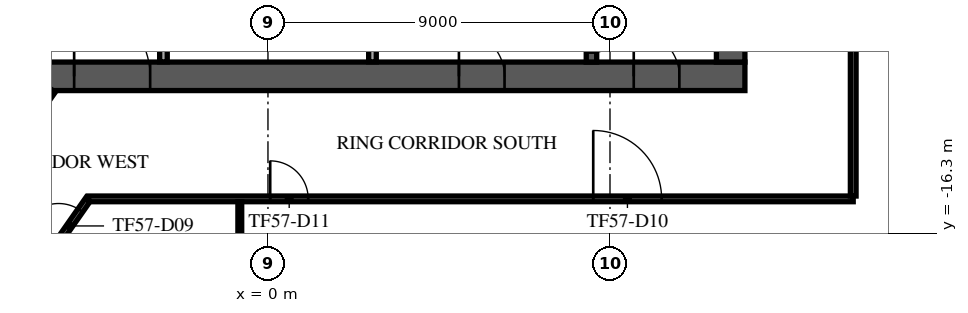
"""IFC4 building model, lengths in metres.
Left out: names, types, materials, properties, quantities, classifications, styles, units other than length and angle.
Written with IfcOpenShell. Run it as: python <this file> out.ifc"""

import sys

from ifc_helpers import new_model, si_unit, direction, frame, frame_2d, origin, place, context, subcontext, project, spatial, rectangle, extrude, element, fill, save


model = new_model("IFC4")
c1 = context("Model", 3, precision=1e-05, world=origin(), true_north=direction((0.0, 1.0)))
c2 = subcontext(c1, "Body", "Model", "MODEL_VIEW")
j1 = project(units=[si_unit("LENGTHUNIT", "METRE"), si_unit("PLANEANGLEUNIT", "RADIAN")], contexts=[c1])
p1 = place(None, origin())
s1 = spatial("IfcSite", under=j1, at=p1, CompositionType="ELEMENT")
p2 = place(p1, origin())
s2 = spatial("IfcBuilding", under=s1, at=p2, CompositionType="ELEMENT")
p3 = place(p2, frame((0.0, 0.0, 242.9)))
s3 = spatial("IfcBuildingStorey", under=s2, at=p3, CompositionType="ELEMENT", Elevation=242.9)
p4 = place(p3, frame((-12.55, -12.175, 0.0), z_axis=(0.0, 0.0, 1.0), x_axis=(1.0, 0.0, 0.0)))
e1 = element("IfcWall", 1, at=p4, inside=s3, PredefinedType="SHEAR", context=c2, shape_type="SweptSolid", body=[
    extrude(rectangle(XDim=25.1, YDim=0.75, at=frame_2d((12.55, 0.0))), origin(), (0.0, 0.0, 1.0), 3.64),
])
p5 = place(p4, frame((7.45, 0.0, 0.0)))
e2 = element("IfcOpeningElement", 2, at=p5, cuts=e1, PredefinedType="OPENING", context=c2, shape_type="SweptSolid", body=[
    extrude(rectangle(XDim=2.0, YDim=2.1, at=frame_2d((1.0, 1.05))), frame((0.0, 0.385, 0.0), z_axis=(0.0, -1.0, 0.0), x_axis=(1.0, 0.0, 0.0)), (0.0, 0.0, 1.0), 0.77),
])
p6 = place(p4, frame((17.575, 0.0, 0.0)))
e3 = element("IfcOpeningElement", 3, at=p6, cuts=e1, PredefinedType="OPENING", context=c2, shape_type="SweptSolid", body=[
    extrude(rectangle(XDim=1.2, YDim=2.1, at=frame_2d((0.6, 1.05))), frame((0.0, 0.385, 0.0), z_axis=(0.0, -1.0, 0.0), x_axis=(1.0, 0.0, 0.0)), (0.0, 0.0, 1.0), 0.77),
])
p7 = place(p4, frame((1.725, 0.0, 0.0)))
e4 = element("IfcOpeningElement", 4, at=p7, cuts=e1, PredefinedType="OPENING", context=c2, shape_type="SweptSolid", body=[
    extrude(rectangle(XDim=1.2, YDim=2.1, at=frame_2d((0.6, 1.05))), frame((0.0, 0.385, 0.0), z_axis=(0.0, -1.0, 0.0), x_axis=(1.0, 0.0, 0.0)), (0.0, 0.0, 1.0), 0.77),
])
p8 = place(p4, frame((22.175, 0.0, 0.0)))
e5 = element("IfcOpeningElement", 5, at=p8, cuts=e1, PredefinedType="OPENING", context=c2, shape_type="SweptSolid", body=[
    extrude(rectangle(XDim=1.2, YDim=2.1, at=frame_2d((0.6, 1.05))), frame((0.0, 0.385, 0.0), z_axis=(0.0, -1.0, 0.0), x_axis=(1.0, 0.0, 0.0)), (0.0, 0.0, 1.0), 0.77),
])
p9 = place(p3, frame((12.175, -11.8, 0.0), z_axis=(0.0, 0.0, 1.0), x_axis=(0.0, 1.0, 0.0)))
e6 = element("IfcWall", 6, at=p9, inside=s3, PredefinedType="SHEAR", context=c2, shape_type="SweptSolid", body=[
    extrude(rectangle(XDim=23.6, YDim=0.75, at=frame_2d((11.8, 0.0))), origin(), (0.0, 0.0, 1.0), 3.64),
])
p10 = place(p9, frame((10.6, 0.0, 0.0)))
e7 = element("IfcOpeningElement", 7, at=p10, cuts=e6, PredefinedType="OPENING", context=c2, shape_type="SweptSolid", body=[
    extrude(rectangle(XDim=2.4, YDim=2.4, at=frame_2d((1.2, 1.2))), frame((0.0, 0.385, 0.0), z_axis=(0.0, -1.0, 0.0), x_axis=(1.0, 0.0, 0.0)), (0.0, 0.0, 1.0), 0.77),
])
p11 = place(p3, frame((8.512, -4.55, 0.0), z_axis=(0.0, 0.0, 1.0), x_axis=(0.0, -1.0, 0.0)))
e8 = element("IfcWall", 8, at=p11, inside=s3, PredefinedType="SOLIDWALL", context=c2, shape_type="SweptSolid", body=[
    extrude(rectangle(XDim=7.25, YDim=0.275, at=frame_2d((3.625, 0.0))), origin(), (0.0, 0.0, 1.0), 3.64),
])
p12 = place(p11, frame((6.0, 0.0, 0.0)))
e9 = element("IfcOpeningElement", 9, at=p12, cuts=e8, PredefinedType="OPENING", context=c2, shape_type="SweptSolid", body=[
    extrude(rectangle(XDim=1.0, YDim=2.1, at=frame_2d((0.5, 1.05))), frame((0.0, 0.147, 0.0), z_axis=(0.0, -1.0, 0.0), x_axis=(1.0, 0.0, 0.0)), (0.0, 0.0, 1.0), 0.295),
])
p13 = place(p3, frame((-2.75, -11.795, 0.0), z_axis=(0.0, 0.0, 1.0), x_axis=(0.0, 1.0, 0.0)))
e10 = element("IfcWall", 10, at=p13, inside=s3, PredefinedType="PARTITIONING", context=c2, shape_type="SweptSolid", body=[
    extrude(rectangle(XDim=2.99, YDim=0.2, at=frame_2d((1.495, 0.0))), origin(), (0.0, 0.0, 1.0), 3.64),
])
p14 = place(p13, frame((0.657, 0.0, 0.0)))
e11 = element("IfcOpeningElement", 11, at=p14, cuts=e10, PredefinedType="OPENING", context=c2, shape_type="SweptSolid", body=[
    extrude(rectangle(XDim=1.8, YDim=2.1, at=frame_2d((0.9, 1.05))), frame((0.0, 0.11, 0.0), z_axis=(0.0, -1.0, 0.0), x_axis=(1.0, 0.0, 0.0)), (0.0, 0.0, 1.0), 0.22),
])
p15 = place(p3, frame((2.75, -11.795, 0.0), z_axis=(0.0, 0.0, 1.0), x_axis=(0.0, 1.0, 0.0)))
e12 = element("IfcWall", 12, at=p15, inside=s3, PredefinedType="PARTITIONING", context=c2, shape_type="SweptSolid", body=[
    extrude(rectangle(XDim=2.99, YDim=0.2, at=frame_2d((1.495, 0.0))), origin(), (0.0, 0.0, 1.0), 3.64),
])
p16 = place(p3, frame((-31.815, -13.98, 0.0), z_axis=(0.0, 0.0, 1.0), x_axis=(0.819151180661, -0.573577669737, 0.0)))
e13 = element("IfcWall", 13, at=p16, inside=s3, PredefinedType="STANDARD", context=c2, shape_type="SweptSolid", body=[
    extrude(rectangle(XDim=36.086, YDim=0.6, at=frame_2d((18.043, 0.0))), origin(), (0.0, 0.0, 1.0), 3.64),
])
p17 = place(p16, frame((1.205, 0.0, 0.9)))
e14 = element("IfcOpeningElement", 14, at=p17, cuts=e13, PredefinedType="OPENING", context=c2, shape_type="SweptSolid", body=[
    extrude(rectangle(XDim=2.1, YDim=2.1, at=frame_2d((1.05, 1.05))), frame((0.0, 0.31, 0.0), z_axis=(0.0, -1.0, 0.0), x_axis=(1.0, 0.0, 0.0)), (0.0, 0.0, 1.0), 0.62),
])
p18 = place(p16, frame((5.716, 0.0, 0.9)))
e15 = element("IfcOpeningElement", 15, at=p18, cuts=e13, PredefinedType="OPENING", context=c2, shape_type="SweptSolid", body=[
    extrude(rectangle(XDim=2.1, YDim=2.1, at=frame_2d((1.05, 1.05))), frame((0.0, 0.31, 0.0), z_axis=(0.0, -1.0, 0.0), x_axis=(1.0, 0.0, 0.0)), (0.0, 0.0, 1.0), 0.62),
])
p19 = place(p16, frame((10.227, 0.0, 0.9)))
e16 = element("IfcOpeningElement", 16, at=p19, cuts=e13, PredefinedType="OPENING", context=c2, shape_type="SweptSolid", body=[
    extrude(rectangle(XDim=2.1, YDim=2.1, at=frame_2d((1.05, 1.05))), frame((0.0, 0.31, 0.0), z_axis=(0.0, -1.0, 0.0), x_axis=(1.0, 0.0, 0.0)), (0.0, 0.0, 1.0), 0.62),
])
p20 = place(p16, frame((14.738, 0.0, 0.9)))
e17 = element("IfcOpeningElement", 17, at=p20, cuts=e13, PredefinedType="OPENING", context=c2, shape_type="SweptSolid", body=[
    extrude(rectangle(XDim=2.1, YDim=2.1, at=frame_2d((1.05, 1.05))), frame((0.0, 0.31, 0.0), z_axis=(0.0, -1.0, 0.0), x_axis=(1.0, 0.0, 0.0)), (0.0, 0.0, 1.0), 0.62),
])
p21 = place(p16, frame((19.249, 0.0, 0.9)))
e18 = element("IfcOpeningElement", 18, at=p21, cuts=e13, PredefinedType="OPENING", context=c2, shape_type="SweptSolid", body=[
    extrude(rectangle(XDim=2.1, YDim=2.1, at=frame_2d((1.05, 1.05))), frame((0.0, 0.31, 0.0), z_axis=(0.0, -1.0, 0.0), x_axis=(1.0, 0.0, 0.0)), (0.0, 0.0, 1.0), 0.62),
])
p22 = place(p16, frame((23.759, 0.0, 0.9)))
e19 = element("IfcOpeningElement", 19, at=p22, cuts=e13, PredefinedType="OPENING", context=c2, shape_type="SweptSolid", body=[
    extrude(rectangle(XDim=2.1, YDim=2.1, at=frame_2d((1.05, 1.05))), frame((0.0, 0.31, 0.0), z_axis=(0.0, -1.0, 0.0), x_axis=(1.0, 0.0, 0.0)), (0.0, 0.0, 1.0), 0.62),
])
p23 = place(p16, frame((28.27, 0.0, 0.9)))
e20 = element("IfcOpeningElement", 20, at=p23, cuts=e13, PredefinedType="OPENING", context=c2, shape_type="SweptSolid", body=[
    extrude(rectangle(XDim=2.1, YDim=2.1, at=frame_2d((1.05, 1.05))), frame((0.0, 0.31, 0.0), z_axis=(0.0, -1.0, 0.0), x_axis=(1.0, 0.0, 0.0)), (0.0, 0.0, 1.0), 0.62),
])
p24 = place(p16, frame((32.781, 0.0, 0.9)))
e21 = element("IfcOpeningElement", 21, at=p24, cuts=e13, PredefinedType="OPENING", context=c2, shape_type="SweptSolid", body=[
    extrude(rectangle(XDim=2.1, YDim=2.1, at=frame_2d((1.05, 1.05))), frame((0.0, 0.31, 0.0), z_axis=(0.0, -1.0, 0.0), x_axis=(1.0, 0.0, 0.0)), (0.0, 0.0, 1.0), 0.62),
])
p25 = place(p3, frame((5.206, -33.362, 0.0), z_axis=(0.0, 0.0, 1.0), x_axis=(0.573577438409, 0.81915134264, 0.0)))
e22 = element("IfcWall", 22, at=p25, inside=s3, PredefinedType="STANDARD", context=c2, shape_type="SweptSolid", body=[
    extrude(rectangle(XDim=48.686, YDim=0.6, at=frame_2d((24.343, 0.0))), origin(), (0.0, 0.0, 1.0), 3.64),
])
p26 = place(p25, frame((1.213, 0.0, 0.9)))
e23 = element("IfcOpeningElement", 23, at=p26, cuts=e22, PredefinedType="OPENING", context=c2, shape_type="SweptSolid", body=[
    extrude(rectangle(XDim=2.0, YDim=2.1, at=frame_2d((1.0, 1.05))), frame((0.0, 0.31, 0.0), z_axis=(0.0, -1.0, 0.0), x_axis=(1.0, 0.0, 0.0)), (0.0, 0.0, 1.0), 0.62),
])
p27 = place(p25, frame((5.639, 0.0, 0.9)))
e24 = element("IfcOpeningElement", 24, at=p27, cuts=e22, PredefinedType="OPENING", context=c2, shape_type="SweptSolid", body=[
    extrude(rectangle(XDim=2.0, YDim=2.1, at=frame_2d((1.0, 1.05))), frame((0.0, 0.31, 0.0), z_axis=(0.0, -1.0, 0.0), x_axis=(1.0, 0.0, 0.0)), (0.0, 0.0, 1.0), 0.62),
])
p28 = place(p25, frame((10.065, 0.0, 0.9)))
e25 = element("IfcOpeningElement", 25, at=p28, cuts=e22, PredefinedType="OPENING", context=c2, shape_type="SweptSolid", body=[
    extrude(rectangle(XDim=2.0, YDim=2.1, at=frame_2d((1.0, 1.05))), frame((0.0, 0.31, 0.0), z_axis=(0.0, -1.0, 0.0), x_axis=(1.0, 0.0, 0.0)), (0.0, 0.0, 1.0), 0.62),
])
p29 = place(p25, frame((14.491, 0.0, 0.9)))
e26 = element("IfcOpeningElement", 26, at=p29, cuts=e22, PredefinedType="OPENING", context=c2, shape_type="SweptSolid", body=[
    extrude(rectangle(XDim=2.0, YDim=2.1, at=frame_2d((1.0, 1.05))), frame((0.0, 0.31, 0.0), z_axis=(0.0, -1.0, 0.0), x_axis=(1.0, 0.0, 0.0)), (0.0, 0.0, 1.0), 0.62),
])
p30 = place(p25, frame((18.917, 0.0, 0.9)))
e27 = element("IfcOpeningElement", 27, at=p30, cuts=e22, PredefinedType="OPENING", context=c2, shape_type="SweptSolid", body=[
    extrude(rectangle(XDim=2.0, YDim=2.1, at=frame_2d((1.0, 1.05))), frame((0.0, 0.31, 0.0), z_axis=(0.0, -1.0, 0.0), x_axis=(1.0, 0.0, 0.0)), (0.0, 0.0, 1.0), 0.62),
])
p31 = place(p25, frame((23.343, 0.0, 0.9)))
e28 = element("IfcOpeningElement", 28, at=p31, cuts=e22, PredefinedType="OPENING", context=c2, shape_type="SweptSolid", body=[
    extrude(rectangle(XDim=2.0, YDim=2.1, at=frame_2d((1.0, 1.05))), frame((0.0, 0.31, 0.0), z_axis=(0.0, -1.0, 0.0), x_axis=(1.0, 0.0, 0.0)), (0.0, 0.0, 1.0), 0.62),
])
p32 = place(p25, frame((27.769, 0.0, 0.9)))
e29 = element("IfcOpeningElement", 29, at=p32, cuts=e22, PredefinedType="OPENING", context=c2, shape_type="SweptSolid", body=[
    extrude(rectangle(XDim=2.0, YDim=2.1, at=frame_2d((1.0, 1.05))), frame((0.0, 0.31, 0.0), z_axis=(0.0, -1.0, 0.0), x_axis=(1.0, 0.0, 0.0)), (0.0, 0.0, 1.0), 0.62),
])
p33 = place(p25, frame((32.195, 0.0, 0.9)))
e30 = element("IfcOpeningElement", 30, at=p33, cuts=e22, PredefinedType="OPENING", context=c2, shape_type="SweptSolid", body=[
    extrude(rectangle(XDim=2.0, YDim=2.1, at=frame_2d((1.0, 1.05))), frame((0.0, 0.31, 0.0), z_axis=(0.0, -1.0, 0.0), x_axis=(1.0, 0.0, 0.0)), (0.0, 0.0, 1.0), 0.62),
])
p34 = place(p25, frame((36.621, 0.0, 0.9)))
e31 = element("IfcOpeningElement", 31, at=p34, cuts=e22, PredefinedType="OPENING", context=c2, shape_type="SweptSolid", body=[
    extrude(rectangle(XDim=2.0, YDim=2.1, at=frame_2d((1.0, 1.05))), frame((0.0, 0.31, 0.0), z_axis=(0.0, -1.0, 0.0), x_axis=(1.0, 0.0, 0.0)), (0.0, 0.0, 1.0), 0.62),
])
p35 = place(p25, frame((41.047, 0.0, 0.9)))
e32 = element("IfcOpeningElement", 32, at=p35, cuts=e22, PredefinedType="OPENING", context=c2, shape_type="SweptSolid", body=[
    extrude(rectangle(XDim=2.0, YDim=2.1, at=frame_2d((1.0, 1.05))), frame((0.0, 0.31, 0.0), z_axis=(0.0, -1.0, 0.0), x_axis=(1.0, 0.0, 0.0)), (0.0, 0.0, 1.0), 0.62),
])
p36 = place(p25, frame((45.473, 0.0, 0.9)))
e33 = element("IfcOpeningElement", 33, at=p36, cuts=e22, PredefinedType="OPENING", context=c2, shape_type="SweptSolid", body=[
    extrude(rectangle(XDim=2.0, YDim=2.1, at=frame_2d((1.0, 1.05))), frame((0.0, 0.31, 0.0), z_axis=(0.0, -1.0, 0.0), x_axis=(1.0, 0.0, 0.0)), (0.0, 0.0, 1.0), 0.62),
])
p37 = place(p3, frame((-26.231, -7.537, 0.0), z_axis=(0.0, 0.0, 1.0), x_axis=(0.819166569978, -0.573555690959, 0.0)))
e34 = element("IfcWall", 34, at=p37, inside=s3, PredefinedType="PARTITIONING", context=c2, shape_type="SweptSolid", body=[
    extrude(rectangle(XDim=34.403, YDim=0.15, at=frame_2d((17.201, 0.0))), origin(), (0.0, 0.0, 1.0), 3.24),
])
p38 = place(p37, frame((3.05, 0.0, 0.0)))
e35 = element("IfcOpeningElement", 35, at=p38, cuts=e34, PredefinedType="OPENING", context=c2, shape_type="SweptSolid", body=[
    extrude(rectangle(XDim=1.8, YDim=2.1, at=frame_2d((0.9, 1.05))), frame((0.0, 0.085, 0.0), z_axis=(0.0, -1.0, 0.0), x_axis=(1.0, 0.0, 0.0)), (0.0, 0.0, 1.0), 0.17),
])
p39 = place(p37, frame((13.103, 0.0, 0.0)))
e36 = element("IfcOpeningElement", 36, at=p39, cuts=e34, PredefinedType="OPENING", context=c2, shape_type="SweptSolid", body=[
    extrude(rectangle(XDim=1.0, YDim=2.1, at=frame_2d((0.5, 1.05))), frame((0.0, 0.085, 0.0), z_axis=(0.0, -1.0, 0.0), x_axis=(1.0, 0.0, 0.0)), (0.0, 0.0, 1.0), 0.17),
])
p40 = place(p37, frame((19.173, 0.0, 0.0)))
e37 = element("IfcOpeningElement", 37, at=p40, cuts=e34, PredefinedType="OPENING", context=c2, shape_type="SweptSolid", body=[
    extrude(rectangle(XDim=1.0, YDim=2.1, at=frame_2d((0.5, 1.05))), frame((0.0, 0.085, 0.0), z_axis=(0.0, -1.0, 0.0), x_axis=(1.0, 0.0, 0.0)), (0.0, 0.0, 1.0), 0.17),
])
p41 = place(p3, frame((-8.651, -16.825, 0.0), z_axis=(0.0, 0.0, 1.0), x_axis=(0.57354712093, 0.819172570386, 0.0)))
e38 = element("IfcWall", 38, at=p41, inside=s3, PredefinedType="PARTITIONING", context=c2, shape_type="SweptSolid", body=[
    extrude(rectangle(XDim=5.218, YDim=0.15, at=frame_2d((2.609, 0.0))), origin(), (0.0, 0.0, 1.0), 3.24),
])
p42 = place(p3, frame((-6.685, -18.201, 0.0), z_axis=(0.0, 0.0, 1.0), x_axis=(0.573438386326, 0.819248690623, 0.0)))
e39 = element("IfcWall", 39, at=p42, inside=s3, PredefinedType="PARTITIONING", context=c2, shape_type="SweptSolid", body=[
    extrude(rectangle(XDim=3.42, YDim=0.15, at=frame_2d((1.71, 0.0))), origin(), (0.0, 0.0, 1.0), 3.24),
])
p43 = place(p42, frame((2.05, 0.0, 0.0)))
e40 = element("IfcOpeningElement", 40, at=p43, cuts=e39, PredefinedType="OPENING", context=c2, shape_type="SweptSolid", body=[
    extrude(rectangle(XDim=1.0, YDim=2.1, at=frame_2d((0.5, 1.05))), frame((0.0, 0.085, 0.0), z_axis=(0.0, -1.0, 0.0), x_axis=(1.0, 0.0, 0.0)), (0.0, 0.0, 1.0), 0.17),
])
p44 = place(p3, frame((-4.723, -15.4, 0.0), z_axis=(0.0, 0.0, 1.0), x_axis=(1.0, 0.0, 0.0)))
e41 = element("IfcWall", 41, at=p44, inside=s3, PredefinedType="PARTITIONING", context=c2, shape_type="SweptSolid", body=[
    extrude(rectangle(XDim=20.123, YDim=0.15, at=frame_2d((10.062, 0.0))), origin(), (0.0, 0.0, 1.0), 3.24),
])
p45 = place(p44, frame((13.282, 0.0, 0.0)))
e42 = element("IfcOpeningElement", 42, at=p45, cuts=e41, PredefinedType="OPENING", context=c2, shape_type="SweptSolid", body=[
    extrude(rectangle(XDim=1.8, YDim=2.1, at=frame_2d((0.9, 1.05))), frame((0.0, 0.085, 0.0), z_axis=(0.0, -1.0, 0.0), x_axis=(1.0, 0.0, 0.0)), (0.0, 0.0, 1.0), 0.17),
])
p46 = place(p44, frame((4.782, 0.0, 0.0)))
e43 = element("IfcOpeningElement", 43, at=p46, cuts=e41, PredefinedType="OPENING", context=c2, shape_type="SweptSolid", body=[
    extrude(rectangle(XDim=1.0, YDim=2.1, at=frame_2d((0.5, 1.05))), frame((0.0, 0.085, 0.0), z_axis=(0.0, -1.0, 0.0), x_axis=(1.0, 0.0, 0.0)), (0.0, 0.0, 1.0), 0.17),
])
p47 = place(p3, frame((15.4, -15.325, 0.0), z_axis=(0.0, 0.0, 1.0), x_axis=(0.0, 1.0, 0.0)))
e44 = element("IfcWall", 44, at=p47, inside=s3, PredefinedType="PARTITIONING", context=c2, shape_type="SweptSolid", body=[
    extrude(rectangle(XDim=17.715, YDim=0.15, at=frame_2d((8.857, 0.0))), origin(), (0.0, 0.0, 1.0), 3.24),
])
p48 = place(p47, frame((7.812, 0.0, 0.0)))
e45 = element("IfcOpeningElement", 45, at=p48, cuts=e44, PredefinedType="OPENING", context=c2, shape_type="SweptSolid", body=[
    extrude(rectangle(XDim=1.0, YDim=2.1, at=frame_2d((0.5, 1.05))), frame((0.0, 0.085, 0.0), z_axis=(0.0, -1.0, 0.0), x_axis=(1.0, 0.0, 0.0)), (0.0, 0.0, 1.0), 0.17),
])
p49 = place(p47, frame((15.123, 0.0, 0.0)))
e46 = element("IfcOpeningElement", 46, at=p49, cuts=e44, PredefinedType="OPENING", context=c2, shape_type="SweptSolid", body=[
    extrude(rectangle(XDim=1.0, YDim=2.1, at=frame_2d((0.5, 1.05))), frame((0.0, 0.085, 0.0), z_axis=(0.0, -1.0, 0.0), x_axis=(1.0, 0.0, 0.0)), (0.0, 0.0, 1.0), 0.17),
])
p50 = place(p3, frame((-0.741, -18.761, 0.0), z_axis=(0.0, 0.0, 1.0), x_axis=(0.0, 1.0, 0.0)))
e47 = element("IfcWall", 47, at=p50, inside=s3, PredefinedType="PARTITIONING", context=c2, shape_type="SweptSolid", body=[
    extrude(rectangle(XDim=3.286, YDim=0.1, at=frame_2d((1.643, 0.0))), origin(), (0.0, 0.0, 1.0), 3.64),
])
p51 = place(p3, frame((15.482, -11.068, 0.0), z_axis=(0.0, 0.0, 1.0), x_axis=(0.990680100766, -0.136209169832, 0.0)))
e48 = element("IfcWall", 48, at=p51, inside=s3, PredefinedType="PARTITIONING", context=c2, shape_type="SweptSolid", body=[
    extrude(rectangle(XDim=4.573, YDim=0.1, at=frame_2d((2.286, 0.0))), origin(), (0.0, 0.0, 1.0), 3.12),
])
p52 = place(p5, origin())
e49 = element("IfcDoor", 49, at=p52, inside=s3, OperationType="SINGLE_SWING_LEFT", PredefinedType="DOOR", context=c2, shape_type="SweptSolid", body=[
    extrude(rectangle(XDim=2.0, YDim=2.1, at=frame_2d((1.0, 1.05))), frame((0.0, 0.025, 0.0), z_axis=(0.0, -1.0, 0.0), x_axis=(1.0, 0.0, 0.0)), (0.0, 0.0, 1.0), 0.05),
])
fill(e2, e49)
p53 = place(p6, origin())
e50 = element("IfcDoor", 50, at=p53, inside=s3, OperationType="SINGLE_SWING_LEFT", PredefinedType="DOOR", context=c2, shape_type="SweptSolid", body=[
    extrude(rectangle(XDim=1.2, YDim=2.1, at=frame_2d((0.6, 1.05))), frame((0.0, 0.025, 0.0), z_axis=(0.0, -1.0, 0.0), x_axis=(1.0, 0.0, 0.0)), (0.0, 0.0, 1.0), 0.05),
])
fill(e3, e50)
p54 = place(p8, origin())
e51 = element("IfcDoor", 51, at=p54, inside=s3, OperationType="SINGLE_SWING_LEFT", PredefinedType="DOOR", context=c2, shape_type="SweptSolid", body=[
    extrude(rectangle(XDim=1.2, YDim=2.1, at=frame_2d((0.6, 1.05))), frame((0.0, 0.025, 0.0), z_axis=(0.0, -1.0, 0.0), x_axis=(1.0, 0.0, 0.0)), (0.0, 0.0, 1.0), 0.05),
])
fill(e5, e51)
p55 = place(p30, origin())
e52 = element("IfcWindow", 52, at=p55, inside=s3, PartitioningType="SINGLE_PANEL", PredefinedType="WINDOW", context=c2, shape_type="SweptSolid", body=[
    extrude(rectangle(XDim=2.0, YDim=2.1, at=frame_2d((1.0, 1.05))), frame((0.0, 0.03, 0.0), z_axis=(0.0, -1.0, 0.0), x_axis=(1.0, 0.0, 0.0)), (0.0, 0.0, 1.0), 0.06),
])
fill(e27, e52)
p56 = place(p43, frame((1.0, 0.0, 0.0), z_axis=(0.0, 0.0, 1.0), x_axis=(-1.0, 0.0, 0.0)))
e53 = element("IfcDoor", 53, at=p56, inside=s3, OperationType="SINGLE_SWING_LEFT", PredefinedType="DOOR", context=c2, shape_type="SweptSolid", body=[
    extrude(rectangle(XDim=1.0, YDim=2.1, at=frame_2d((0.5, 1.05))), frame((0.0, 0.025, 0.0), z_axis=(0.0, -1.0, 0.0), x_axis=(1.0, 0.0, 0.0)), (0.0, 0.0, 1.0), 0.05),
])
fill(e40, e53)
p57 = place(p45, frame((1.8, 0.0, 0.0), z_axis=(0.0, 0.0, 1.0), x_axis=(-1.0, 0.0, 0.0)))
e54 = element("IfcDoor", 54, at=p57, inside=s3, OperationType="DOUBLE_DOOR_SINGLE_SWING", PredefinedType="DOOR", context=c2, shape_type="SweptSolid", body=[
    extrude(rectangle(XDim=1.8, YDim=2.1, at=frame_2d((0.9, 1.05))), frame((0.0, 0.025, 0.0), z_axis=(0.0, -1.0, 0.0), x_axis=(1.0, 0.0, 0.0)), (0.0, 0.0, 1.0), 0.05),
])
fill(e42, e54)
p58 = place(p46, frame((1.0, 0.0, 0.0), z_axis=(0.0, 0.0, 1.0), x_axis=(-1.0, 0.0, 0.0)))
e55 = element("IfcDoor", 55, at=p58, inside=s3, OperationType="SINGLE_SWING_RIGHT", PredefinedType="DOOR", context=c2, shape_type="SweptSolid", body=[
    extrude(rectangle(XDim=1.0, YDim=2.1, at=frame_2d((0.5, 1.05))), frame((0.0, 0.025, 0.0), z_axis=(0.0, -1.0, 0.0), x_axis=(1.0, 0.0, 0.0)), (0.0, 0.0, 1.0), 0.05),
])
fill(e43, e55)
save(model, sys.argv[1])
